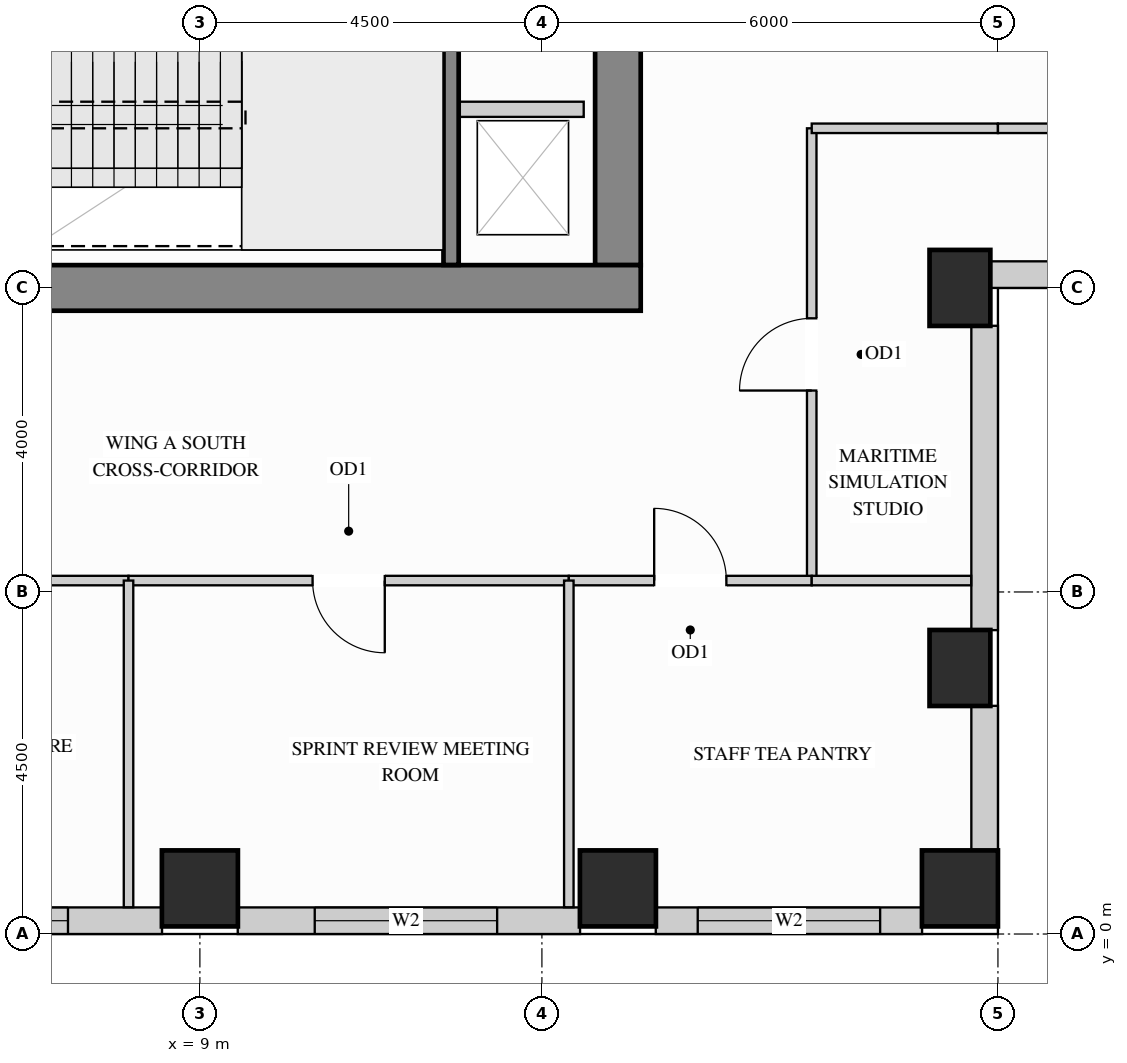
"""IFC4 building model, lengths in metres.
Left out: names, types, materials, properties, quantities, classifications, styles, units other than length and angle.
Written with IfcOpenShell. Run it as: python <this file> out.ifc"""

import sys

from ifc_helpers import new_model, si_unit, direction, frame, frame_2d, origin, origin_2d, place, context, subcontext, project, spatial, rectangle, extrude, source, transform, mapped, element, fill, save


model = new_model("IFC4")
c1 = context("Model", 3, precision=1e-05, world=origin(), true_north=direction((0.0, 1.0)))
c2 = subcontext(c1, "Body", "Model", "MODEL_VIEW")
j1 = project(units=[si_unit("LENGTHUNIT", "METRE"), si_unit("PLANEANGLEUNIT", "RADIAN")], contexts=[c1])
p1 = place(None, origin())
s1 = spatial("IfcSite", under=j1, at=p1, CompositionType="ELEMENT")
p2 = place(p1, origin())
s2 = spatial("IfcBuilding", under=s1, at=p2, CompositionType="ELEMENT")
p3 = place(p2, frame((0.0, 0.0, 168.3)))
s3 = spatial("IfcBuildingStorey", under=s2, at=p3, CompositionType="ELEMENT", Elevation=168.3)
m1 = source(origin(), c2, "Body", "SweptSolid", [
    extrude(rectangle(XDim=0.8, YDim=1.0, at=origin_2d()), origin(), (0.0, 0.0, 1.0), 3.4),
])
for number, where, z_axis, x_axis in (
    (1, (19.0, 3.5, 0.0), (0.0, 0.0, 1.0), (1.0, 0.0, 0.0)),
    (2, (19.0, 8.5, 0.0), (0.0, 0.0, 1.0), (1.0, 0.0, 0.0)),
):
    element("IfcColumn", number, at=place(p3, frame(where, z_axis=z_axis, x_axis=x_axis)), inside=s3, PredefinedType="COLUMN", context=c2, shape_type="MappedRepresentation", body=[
        mapped(m1, transform((0.0, 0.0, 0.0), x_axis=(1.0, 0.0, 0.0), y_axis=(0.0, 1.0, 0.0), z_axis=(0.0, 0.0, 1.0))),
    ])
m2 = source(origin(), c2, "Body", "SweptSolid", [
    extrude(rectangle(XDim=1.0, YDim=1.0, at=origin_2d()), origin(), (0.0, 0.0, 1.0), 3.4),
])
for number, where, z_axis, x_axis in (
    (3, (14.5, 0.6, 0.0), (0.0, 0.0, 1.0), (1.0, 0.0, 0.0)),
    (4, (19.0, 0.6, 0.0), (0.0, 0.0, 1.0), (1.0, 0.0, 0.0)),
    (5, (9.0, 0.6, 0.0), (0.0, 0.0, 1.0), (1.0, 0.0, 0.0)),
):
    element("IfcColumn", number, at=place(p3, frame(where, z_axis=z_axis, x_axis=x_axis)), inside=s3, PredefinedType="COLUMN", context=c2, shape_type="MappedRepresentation", body=[
        mapped(m2, transform((0.0, 0.0, 0.0), x_axis=(1.0, 0.0, 0.0), y_axis=(0.0, 1.0, 0.0), z_axis=(0.0, 0.0, 1.0))),
    ])
m3 = source(origin(), c2, "Body", "SweptSolid", [
    extrude(rectangle(XDim=10.02, YDim=0.6, at=frame_2d((5.01, 0.0))), origin(), (0.0, 0.0, 1.0), 3.4),
])
p4 = place(p3, frame((14.5, 8.8, 0.0), z_axis=(0.0, 0.0, 1.0), x_axis=(0.0, 1.0, 0.0)))
e6 = element("IfcWall", 6, at=p4, inside=s3, PredefinedType="SHEAR", context=c2, shape_type="MappedRepresentation", body=[
    mapped(m3, transform((0.0, 0.0, 0.0), x_axis=(1.0, 0.0, 0.0), y_axis=(0.0, 1.0, 0.0), z_axis=(0.0, 0.0, 1.0))),
])
m4 = source(origin(), c2, "Body", "SweptSolid", [
    extrude(rectangle(XDim=10.6, YDim=0.6, at=frame_2d((5.3, 0.0))), origin(), (0.0, 0.0, 1.0), 3.4),
])
p5 = place(p3, frame((4.2, 8.5, 0.0), z_axis=(0.0, 0.0, 1.0), x_axis=(1.0, 0.0, 0.0)))
e7 = element("IfcWall", 7, at=p5, inside=s3, PredefinedType="SHEAR", context=c2, shape_type="MappedRepresentation", body=[
    mapped(m4, transform((0.0, 0.0, 0.0), x_axis=(1.0, 0.0, 0.0), y_axis=(0.0, 1.0, 0.0), z_axis=(0.0, 0.0, 1.0))),
])
p6 = place(p3, frame((3.998, 0.175, 0.0), z_axis=(0.0, 0.0, 1.0), x_axis=(1.0, 0.0, 0.0)))
e8 = element("IfcWall", 8, at=p6, inside=s3, PredefinedType="SOLIDWALL", context=c2, shape_type="SweptSolid", body=[
    extrude(rectangle(XDim=4.504, YDim=0.35, at=frame_2d((2.252, 0.0))), origin(), (0.0, 0.0, 1.0), 2.612),
])
p7 = place(p6, frame((0.866, 0.0, 0.78)))
e9 = element("IfcOpeningElement", 9, at=p7, cuts=e8, PredefinedType="OPENING", context=c2, shape_type="SweptSolid", body=[
    extrude(rectangle(XDim=2.4, YDim=1.652, at=frame_2d((1.2, 0.826))), frame((0.0, 0.185, 0.0), z_axis=(0.0, -1.0, 0.0), x_axis=(1.0, 0.0, 0.0)), (0.0, 0.0, 1.0), 0.37),
])
p8 = place(p3, frame((9.498, 0.175, 0.0), z_axis=(0.0, 0.0, 1.0), x_axis=(1.0, 0.0, 0.0)))
e10 = element("IfcWall", 10, at=p8, inside=s3, PredefinedType="SOLIDWALL", context=c2, shape_type="SweptSolid", body=[
    extrude(rectangle(XDim=4.504, YDim=0.35, at=frame_2d((2.252, 0.0))), origin(), (0.0, 0.0, 1.0), 2.612),
])
p9 = place(p8, frame((1.013, 0.0, 0.78)))
e11 = element("IfcOpeningElement", 11, at=p9, cuts=e10, PredefinedType="OPENING", context=c2, shape_type="SweptSolid", body=[
    extrude(rectangle(XDim=2.4, YDim=1.652, at=frame_2d((1.2, 0.826))), frame((0.0, 0.185, 0.0), z_axis=(0.0, -1.0, 0.0), x_axis=(1.0, 0.0, 0.0)), (0.0, 0.0, 1.0), 0.37),
])
p10 = place(p3, frame((14.998, 0.175, 0.0), z_axis=(0.0, 0.0, 1.0), x_axis=(1.0, 0.0, 0.0)))
e12 = element("IfcWall", 12, at=p10, inside=s3, PredefinedType="SOLIDWALL", context=c2, shape_type="SweptSolid", body=[
    extrude(rectangle(XDim=3.504, YDim=0.35, at=frame_2d((1.752, 0.0))), origin(), (0.0, 0.0, 1.0), 2.612),
])
p11 = place(p10, frame((0.552, 0.0, 0.78)))
e13 = element("IfcOpeningElement", 13, at=p11, cuts=e12, PredefinedType="OPENING", context=c2, shape_type="SweptSolid", body=[
    extrude(rectangle(XDim=2.4, YDim=1.652, at=frame_2d((1.2, 0.826))), frame((0.0, 0.185, 0.0), z_axis=(0.0, -1.0, 0.0), x_axis=(1.0, 0.0, 0.0)), (0.0, 0.0, 1.0), 0.37),
])
m5 = source(origin(), c2, "Body", "SweptSolid", [
    extrude(rectangle(XDim=1.904, YDim=0.35, at=frame_2d((0.952, 0.0))), origin(), (0.0, 0.0, 1.0), 2.612),
])
p12 = place(p3, frame((19.325, 1.098, 0.0), z_axis=(0.0, 0.0, 1.0), x_axis=(0.0, 1.0, 0.0)))
e14 = element("IfcWall", 14, at=p12, inside=s3, PredefinedType="SOLIDWALL", context=c2, shape_type="MappedRepresentation", body=[
    mapped(m5, transform((0.0, 0.0, 0.0), x_axis=(1.0, 0.0, 0.0), y_axis=(0.0, 1.0, 0.0), z_axis=(0.0, 0.0, 1.0))),
])
m6 = source(origin(), c2, "Body", "SweptSolid", [
    extrude(rectangle(XDim=4.004, YDim=0.35, at=frame_2d((2.002, 0.0))), origin(), (0.0, 0.0, 1.0), 2.612),
])
p13 = place(p3, frame((19.325, 3.998, 0.0), z_axis=(0.0, 0.0, 1.0), x_axis=(0.0, 1.0, 0.0)))
e15 = element("IfcWall", 15, at=p13, inside=s3, PredefinedType="SOLIDWALL", context=c2, shape_type="MappedRepresentation", body=[
    mapped(m6, transform((0.0, 0.0, 0.0), x_axis=(1.0, 0.0, 0.0), y_axis=(0.0, 1.0, 0.0), z_axis=(0.0, 0.0, 1.0))),
])
p14 = place(p3, frame((19.398, 8.675, 0.0), z_axis=(0.0, 0.0, 1.0), x_axis=(1.0, 0.0, 0.0)))
e16 = element("IfcWall", 16, at=p14, inside=s3, PredefinedType="SOLIDWALL", context=c2, shape_type="SweptSolid", body=[
    extrude(rectangle(XDim=3.604, YDim=0.35, at=frame_2d((1.802, 0.0))), origin(), (0.0, 0.0, 1.0), 3.385),
])
p15 = place(p14, frame((1.067, 0.0, 0.78)))
e17 = element("IfcOpeningElement", 17, at=p15, cuts=e16, PredefinedType="OPENING", context=c2, shape_type="SweptSolid", body=[
    extrude(rectangle(XDim=1.5, YDim=2.0, at=frame_2d((0.75, 1.0))), frame((0.0, 0.185, 0.0), z_axis=(0.0, -1.0, 0.0), x_axis=(1.0, 0.0, 0.0)), (0.0, 0.0, 1.0), 0.37),
])
p16 = place(p3, frame((17.05, 4.65, 0.0), z_axis=(0.0, 0.0, 1.0), x_axis=(0.0, 1.0, 0.0)))
e18 = element("IfcWall", 18, at=p16, inside=s3, PredefinedType="PARTITIONING", context=c2, shape_type="SweptSolid", body=[
    extrude(rectangle(XDim=5.95, YDim=0.125, at=frame_2d((2.975, 0.0))), origin(), (0.0, 0.0, 1.0), 3.385),
])
p17 = place(p16, frame((2.5, 0.0, 0.0)))
e19 = element("IfcOpeningElement", 19, at=p17, cuts=e18, PredefinedType="OPENING", context=c2, shape_type="SweptSolid", body=[
    extrude(rectangle(XDim=0.95, YDim=2.15, at=frame_2d((0.475, 1.075))), frame((0.0, 0.073, 0.0), z_axis=(0.0, -1.0, 0.0), x_axis=(1.0, 0.0, 0.0)), (0.0, 0.0, 1.0), 0.145),
])
m7 = source(origin(), c2, "Body", "SweptSolid", [
    extrude(rectangle(XDim=2.45, YDim=0.125, at=frame_2d((1.225, 0.0))), origin(), (0.0, 0.0, 1.0), 3.385),
])
p18 = place(p3, frame((17.05, 10.6, 0.0), z_axis=(0.0, 0.0, 1.0), x_axis=(1.0, 0.0, 0.0)))
e20 = element("IfcWall", 20, at=p18, inside=s3, PredefinedType="PARTITIONING", context=c2, shape_type="MappedRepresentation", body=[
    mapped(m7, transform((0.0, 0.0, 0.0), x_axis=(1.0, 0.0, 0.0), y_axis=(0.0, 1.0, 0.0), z_axis=(0.0, 0.0, 1.0))),
])
p19 = place(p3, frame((19.5, 10.6, 0.0), z_axis=(0.0, 0.0, 1.0), x_axis=(1.0, 0.0, 0.0)))
e21 = element("IfcWall", 21, at=p19, inside=s3, PredefinedType="PARTITIONING", context=c2, shape_type="SweptSolid", body=[
    extrude(rectangle(XDim=14.9, YDim=0.125, at=frame_2d((7.45, 0.0))), origin(), (0.0, 0.0, 1.0), 3.385),
])
p20 = place(p19, frame((6.975, 0.0, 0.0)))
e22 = element("IfcOpeningElement", 22, at=p20, cuts=e21, PredefinedType="OPENING", context=c2, shape_type="SweptSolid", body=[
    extrude(rectangle(XDim=0.95, YDim=2.15, at=frame_2d((0.475, 1.075))), frame((0.0, 0.073, 0.0), z_axis=(0.0, -1.0, 0.0), x_axis=(1.0, 0.0, 0.0)), (0.0, 0.0, 1.0), 0.145),
])
p21 = place(p3, frame((2.45, 4.65, 0.0), z_axis=(0.0, 0.0, 1.0), x_axis=(1.0, 0.0, 0.0)))
e23 = element("IfcWall", 23, at=p21, inside=s3, PredefinedType="PARTITIONING", context=c2, shape_type="SweptSolid", body=[
    extrude(rectangle(XDim=5.611, YDim=0.125, at=frame_2d((2.806, 0.0))), origin(), (0.0, 0.0, 1.0), 2.848),
])
p22 = place(p21, frame((2.331, 0.0, 0.0)))
e24 = element("IfcOpeningElement", 24, at=p22, cuts=e23, PredefinedType="OPENING", context=c2, shape_type="SweptSolid", body=[
    extrude(rectangle(XDim=0.95, YDim=2.15, at=frame_2d((0.475, 1.075))), frame((0.0, 0.073, 0.0), z_axis=(0.0, -1.0, 0.0), x_axis=(1.0, 0.0, 0.0)), (0.0, 0.0, 1.0), 0.145),
])
p23 = place(p3, frame((8.061, 4.65, 0.0), z_axis=(0.0, 0.0, 1.0), x_axis=(1.0, 0.0, 0.0)))
e25 = element("IfcWall", 25, at=p23, inside=s3, PredefinedType="PARTITIONING", context=c2, shape_type="SweptSolid", body=[
    extrude(rectangle(XDim=5.793, YDim=0.125, at=frame_2d((2.896, 0.0))), origin(), (0.0, 0.0, 1.0), 2.848),
])
p24 = place(p23, frame((2.421, 0.0, 0.0)))
e26 = element("IfcOpeningElement", 26, at=p24, cuts=e25, PredefinedType="OPENING", context=c2, shape_type="SweptSolid", body=[
    extrude(rectangle(XDim=0.95, YDim=2.15, at=frame_2d((0.475, 1.075))), frame((0.0, 0.073, 0.0), z_axis=(0.0, -1.0, 0.0), x_axis=(1.0, 0.0, 0.0)), (0.0, 0.0, 1.0), 0.145),
])
p25 = place(p3, frame((13.854, 4.65, 0.0), z_axis=(0.0, 0.0, 1.0), x_axis=(1.0, 0.0, 0.0)))
e27 = element("IfcWall", 27, at=p25, inside=s3, PredefinedType="PARTITIONING", context=c2, shape_type="SweptSolid", body=[
    extrude(rectangle(XDim=3.196, YDim=0.125, at=frame_2d((1.598, 0.0))), origin(), (0.0, 0.0, 1.0), 2.848),
])
p26 = place(p25, frame((1.123, 0.0, 0.0)))
e28 = element("IfcOpeningElement", 28, at=p26, cuts=e27, PredefinedType="OPENING", context=c2, shape_type="SweptSolid", body=[
    extrude(rectangle(XDim=0.95, YDim=2.15, at=frame_2d((0.475, 1.075))), frame((0.0, 0.073, 0.0), z_axis=(0.0, -1.0, 0.0), x_axis=(1.0, 0.0, 0.0)), (0.0, 0.0, 1.0), 0.145),
])
m8 = source(origin(), c2, "Body", "SweptSolid", [
    extrude(rectangle(XDim=2.098, YDim=0.125, at=frame_2d((1.049, 0.0))), origin(), (0.0, 0.0, 1.0), 2.848),
])
p27 = place(p3, frame((17.05, 4.65, 0.0), z_axis=(0.0, 0.0, 1.0), x_axis=(1.0, 0.0, 0.0)))
e29 = element("IfcWall", 29, at=p27, inside=s3, PredefinedType="PARTITIONING", context=c2, shape_type="MappedRepresentation", body=[
    mapped(m8, transform((0.0, 0.0, 0.0), x_axis=(1.0, 0.0, 0.0), y_axis=(0.0, 1.0, 0.0), z_axis=(0.0, 0.0, 1.0))),
])
m9 = source(origin(), c2, "Body", "SweptSolid", [
    extrude(rectangle(XDim=4.298, YDim=0.125, at=frame_2d((2.149, 0.0))), origin(), (0.0, 0.0, 1.0), 3.385),
])
for number, where, z_axis, x_axis in (
    (30, (8.061, 0.352, 0.0), (0.0, 0.0, 1.0), (0.0, 1.0, 0.0)),
    (31, (13.854, 0.352, 0.0), (0.0, 0.0, 1.0), (0.0, 1.0, 0.0)),
):
    element("IfcWall", number, at=place(p3, frame(where, z_axis=z_axis, x_axis=x_axis)), inside=s3, PredefinedType="PARTITIONING", context=c2, shape_type="MappedRepresentation", body=[
        mapped(m9, transform((0.0, 0.0, 0.0), x_axis=(1.0, 0.0, 0.0), y_axis=(0.0, 1.0, 0.0), z_axis=(0.0, 0.0, 1.0))),
    ])
m10 = source(origin(), c2, "Body", "SweptSolid", [
    extrude(rectangle(XDim=1.63, YDim=0.2, at=frame_2d((0.815, 0.0))), origin(), (0.0, 0.0, 1.0), 3.385),
])
p28 = place(p3, frame((12.42, 10.85, 0.0), z_axis=(0.0, 0.0, 1.0), x_axis=(1.0, 0.0, 0.0)))
e32 = element("IfcWall", 32, at=p28, inside=s3, PredefinedType="PARTITIONING", context=c2, shape_type="MappedRepresentation", body=[
    mapped(m10, transform((0.0, 0.0, 0.0), x_axis=(1.0, 0.0, 0.0), y_axis=(0.0, 1.0, 0.0), z_axis=(0.0, 0.0, 1.0))),
])
m11 = source(origin(), c2, "Body", "SweptSolid", [
    extrude(rectangle(XDim=3.753, YDim=0.2, at=frame_2d((1.876, 0.0))), origin(), (0.0, 0.0, 1.0), 3.4),
])
p29 = place(p3, frame((12.305, 8.802, 0.0), z_axis=(0.0, 0.0, 1.0), x_axis=(0.0, 1.0, 0.0)))
e33 = element("IfcWall", 33, at=p29, inside=s3, PredefinedType="SHEAR", context=c2, shape_type="MappedRepresentation", body=[
    mapped(m11, transform((0.0, 0.0, 0.0), x_axis=(1.0, 0.0, 0.0), y_axis=(0.0, 1.0, 0.0), z_axis=(0.0, 0.0, 1.0))),
])
m12 = source(origin(), c2, "Body", "SweptSolid", [
    extrude(rectangle(XDim=0.95, YDim=2.15, at=frame_2d((0.475, 1.075))), frame((0.0, 0.025, 0.0), z_axis=(0.0, -1.0, 0.0), x_axis=(1.0, 0.0, 0.0)), (0.0, 0.0, 1.0), 0.05),
])
p30 = place(p17, origin())
e34 = element("IfcDoor", 34, at=p30, inside=s3, OperationType="SINGLE_SWING_LEFT", PredefinedType="DOOR", context=c2, shape_type="MappedRepresentation", body=[
    mapped(m12, transform((0.0, 0.0, 0.0), x_axis=(1.0, 0.0, 0.0), y_axis=(0.0, 1.0, 0.0), z_axis=(0.0, 0.0, 1.0))),
])
fill(e19, e34)
p31 = place(p24, origin())
e35 = element("IfcDoor", 35, at=p31, inside=s3, OperationType="SINGLE_SWING_RIGHT", PredefinedType="DOOR", context=c2, shape_type="MappedRepresentation", body=[
    mapped(m12, transform((0.0, 0.0, 0.0), x_axis=(1.0, 0.0, 0.0), y_axis=(0.0, 1.0, 0.0), z_axis=(0.0, 0.0, 1.0))),
])
fill(e26, e35)
p32 = place(p26, origin())
e36 = element("IfcDoor", 36, at=p32, inside=s3, OperationType="SINGLE_SWING_LEFT", PredefinedType="DOOR", context=c2, shape_type="MappedRepresentation", body=[
    mapped(m12, transform((0.0, 0.0, 0.0), x_axis=(1.0, 0.0, 0.0), y_axis=(0.0, 1.0, 0.0), z_axis=(0.0, 0.0, 1.0))),
])
fill(e28, e36)
m13 = source(origin(), c2, "Body", "SweptSolid", [
    extrude(rectangle(XDim=2.4, YDim=1.652, at=frame_2d((1.2, 0.826))), frame((0.0, 0.03, 0.0), z_axis=(0.0, -1.0, 0.0), x_axis=(1.0, 0.0, 0.0)), (0.0, 0.0, 1.0), 0.06),
])
p33 = place(p7, origin())
e37 = element("IfcWindow", 37, at=p33, inside=s3, PartitioningType="SINGLE_PANEL", PredefinedType="WINDOW", context=c2, shape_type="MappedRepresentation", body=[
    mapped(m13, transform((0.0, 0.0, 0.0), x_axis=(1.0, 0.0, 0.0), y_axis=(0.0, 1.0, 0.0), z_axis=(0.0, 0.0, 1.0))),
])
fill(e9, e37)
p34 = place(p9, origin())
e38 = element("IfcWindow", 38, at=p34, inside=s3, PartitioningType="SINGLE_PANEL", PredefinedType="WINDOW", context=c2, shape_type="MappedRepresentation", body=[
    mapped(m13, transform((0.0, 0.0, 0.0), x_axis=(1.0, 0.0, 0.0), y_axis=(0.0, 1.0, 0.0), z_axis=(0.0, 0.0, 1.0))),
])
fill(e11, e38)
p35 = place(p11, origin())
e39 = element("IfcWindow", 39, at=p35, inside=s3, PartitioningType="SINGLE_PANEL", PredefinedType="WINDOW", context=c2, shape_type="MappedRepresentation", body=[
    mapped(m13, transform((0.0, 0.0, 0.0), x_axis=(1.0, 0.0, 0.0), y_axis=(0.0, 1.0, 0.0), z_axis=(0.0, 0.0, 1.0))),
])
fill(e13, e39)
save(model, sys.argv[1])
